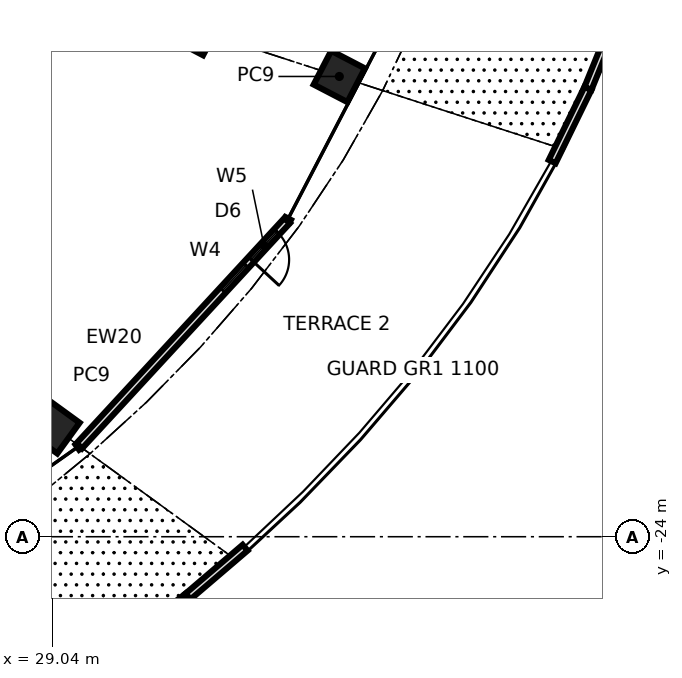
"""IFC4 building model, lengths in metres.
Left out: names, types, materials, properties, quantities, classifications, styles, units other than length and angle.
Written with IfcOpenShell. Run it as: python <this file> out.ifc"""

import sys

from ifc_helpers import new_model, si_unit, direction, frame, frame_2d, origin, origin_2d, place, context, subcontext, project, spatial, rectangle, extrude, element, fill, save


model = new_model("IFC4")
c1 = context("Model", 3, precision=1e-05, world=origin(), true_north=direction((0.0, 1.0)))
c2 = subcontext(c1, "Body", "Model", "MODEL_VIEW")
j1 = project(units=[si_unit("LENGTHUNIT", "METRE"), si_unit("PLANEANGLEUNIT", "RADIAN")], contexts=[c1])
p1 = place(None, origin())
s1 = spatial("IfcSite", under=j1, at=p1, CompositionType="ELEMENT")
p2 = place(p1, origin())
s2 = spatial("IfcBuilding", under=s1, at=p2, CompositionType="ELEMENT")
p3 = place(p2, frame((0.0, 0.0, 5.6)))
s3 = spatial("IfcBuildingStorey", under=s2, at=p3, CompositionType="ELEMENT", Elevation=5.6)
for number, where, z_axis, x_axis in (
    (1, (29.057, -21.111, 0.0), (0.0, 0.0, 1.0), (0.809, -0.588, 0.0)),
    (2, (36.589, -11.888, 0.0), (0.0, 0.0, 1.0), (0.887, -0.461, 0.0)),
    (3, (32.794, -10.655, 0.0), (0.0, 0.0, 1.0), (0.885, -0.465, 0.0)),
):
    element("IfcColumn", number, at=place(p3, frame(where, z_axis=z_axis, x_axis=x_axis)), inside=s3, PredefinedType="COLUMN", context=c2, shape_type="SweptSolid", body=[
        extrude(rectangle(XDim=1.0, YDim=1.0, at=origin_2d()), origin(), (0.0, 0.0, 1.0), 5.0),
    ])
p4 = place(p3, frame((29.745, -21.611, 0.0), z_axis=(0.0, 0.0, 1.0), x_axis=(0.678129311606, 0.734942607787, 0.0)))
e4 = element("IfcWall", 4, at=p4, inside=s3, PredefinedType="SOLIDWALL", context=c2, shape_type="SweptSolid", body=[
    extrude(rectangle(XDim=8.07, YDim=0.2, at=frame_2d((4.035, 0.0))), origin(), (0.0, 0.0, 1.0), 4.8),
])
p5 = place(p4, frame((6.67, 0.0, 0.0)))
e5 = element("IfcOpeningElement", 5, at=p5, cuts=e4, PredefinedType="OPENING", context=c2, shape_type="SweptSolid", body=[
    extrude(rectangle(XDim=1.0, YDim=2.4, at=frame_2d((0.5, 1.2))), frame((0.0, 0.11, 0.0), z_axis=(0.0, -1.0, 0.0), x_axis=(1.0, 0.0, 0.0)), (0.0, 0.0, 1.0), 0.22),
])
p6 = place(p4, frame((5.57, 0.0, 0.3)))
e6 = element("IfcOpeningElement", 6, at=p6, cuts=e4, PredefinedType="OPENING", context=c2, shape_type="SweptSolid", body=[
    extrude(rectangle(XDim=0.9, YDim=2.1, at=frame_2d((0.45, 1.05))), frame((0.0, 0.11, 0.0), z_axis=(0.0, -1.0, 0.0), x_axis=(1.0, 0.0, 0.0)), (0.0, 0.0, 1.0), 0.22),
])
p7 = place(p4, frame((6.67, 0.0, 2.7)))
e7 = element("IfcOpeningElement", 7, at=p7, cuts=e4, PredefinedType="OPENING", context=c2, shape_type="SweptSolid", body=[
    extrude(rectangle(XDim=1.0, YDim=0.6, at=frame_2d((0.5, 0.3))), frame((0.0, 0.11, 0.0), z_axis=(0.0, -1.0, 0.0), x_axis=(1.0, 0.0, 0.0)), (0.0, 0.0, 1.0), 0.22),
])
p8 = place(p3, frame((31.069, -26.773, 0.0), z_axis=(0.0, 0.0, 1.0), x_axis=(0.788395618403, 0.61516855323, 0.0)))
e8 = element("IfcWall", 8, at=p8, inside=s3, PredefinedType="PARAPET", context=c2, shape_type="SweptSolid", body=[
    extrude(rectangle(XDim=1.953, YDim=0.2, at=frame_2d((0.977, 0.0))), origin(), (0.0, 0.0, 1.0), 1.1),
])
p9 = place(p3, frame((32.609, -25.571, 0.0), z_axis=(0.0, 0.0, 1.0), x_axis=(0.760381310576, 0.649476914545, 0.0)))
e9 = element("IfcWall", 9, at=p9, inside=s3, PredefinedType="PARAPET", context=c2, shape_type="SweptSolid", body=[
    extrude(rectangle(XDim=1.975, YDim=0.2, at=frame_2d((0.987, 0.0))), origin(), (0.0, 0.0, 1.0), 1.1),
])
p10 = place(p3, frame((42.191, -14.127, 0.0), z_axis=(0.0, 0.0, 1.0), x_axis=(0.438944420808, 0.898514215492, 0.0)))
e10 = element("IfcWall", 10, at=p10, inside=s3, PredefinedType="PARAPET", context=c2, shape_type="SweptSolid", body=[
    extrude(rectangle(XDim=2.143, YDim=0.2, at=frame_2d((1.071, 0.0))), origin(), (0.0, 0.0, 1.0), 1.1),
])
p11 = place(p3, frame((43.131, -12.202, 0.0), z_axis=(0.0, 0.0, 1.0), x_axis=(0.377156278068, 0.926149632572, 0.0)))
e11 = element("IfcWall", 11, at=p11, inside=s3, PredefinedType="PARAPET", context=c2, shape_type="SweptSolid", body=[
    extrude(rectangle(XDim=2.151, YDim=0.2, at=frame_2d((1.076, 0.0))), origin(), (0.0, 0.0, 1.0), 1.1),
])
p12 = place(p5, frame((1.0, 0.0, 0.0), z_axis=(0.0, 0.0, 1.0), x_axis=(-1.0, 0.0, 0.0)))
e12 = element("IfcDoor", 12, at=p12, inside=s3, OperationType="SINGLE_SWING_RIGHT", PredefinedType="DOOR", context=c2, shape_type="SweptSolid", body=[
    extrude(rectangle(XDim=1.0, YDim=2.4, at=frame_2d((0.5, 1.2))), frame((0.0, 0.025, 0.0), z_axis=(0.0, -1.0, 0.0), x_axis=(1.0, 0.0, 0.0)), (0.0, 0.0, 1.0), 0.05),
])
fill(e5, e12)
p13 = place(p6, origin())
e13 = element("IfcWindow", 13, at=p13, inside=s3, PartitioningType="SINGLE_PANEL", PredefinedType="WINDOW", context=c2, shape_type="SweptSolid", body=[
    extrude(rectangle(XDim=0.9, YDim=2.1, at=frame_2d((0.45, 1.05))), frame((0.0, 0.03, 0.0), z_axis=(0.0, -1.0, 0.0), x_axis=(1.0, 0.0, 0.0)), (0.0, 0.0, 1.0), 0.06),
])
fill(e6, e13)
p14 = place(p7, origin())
e14 = element("IfcWindow", 14, at=p14, inside=s3, PartitioningType="SINGLE_PANEL", PredefinedType="WINDOW", context=c2, shape_type="SweptSolid", body=[
    extrude(rectangle(XDim=1.0, YDim=0.6, at=frame_2d((0.5, 0.3))), frame((0.0, 0.03, 0.0), z_axis=(0.0, -1.0, 0.0), x_axis=(1.0, 0.0, 0.0)), (0.0, 0.0, 1.0), 0.06),
])
fill(e7, e14)
save(model, sys.argv[1])
